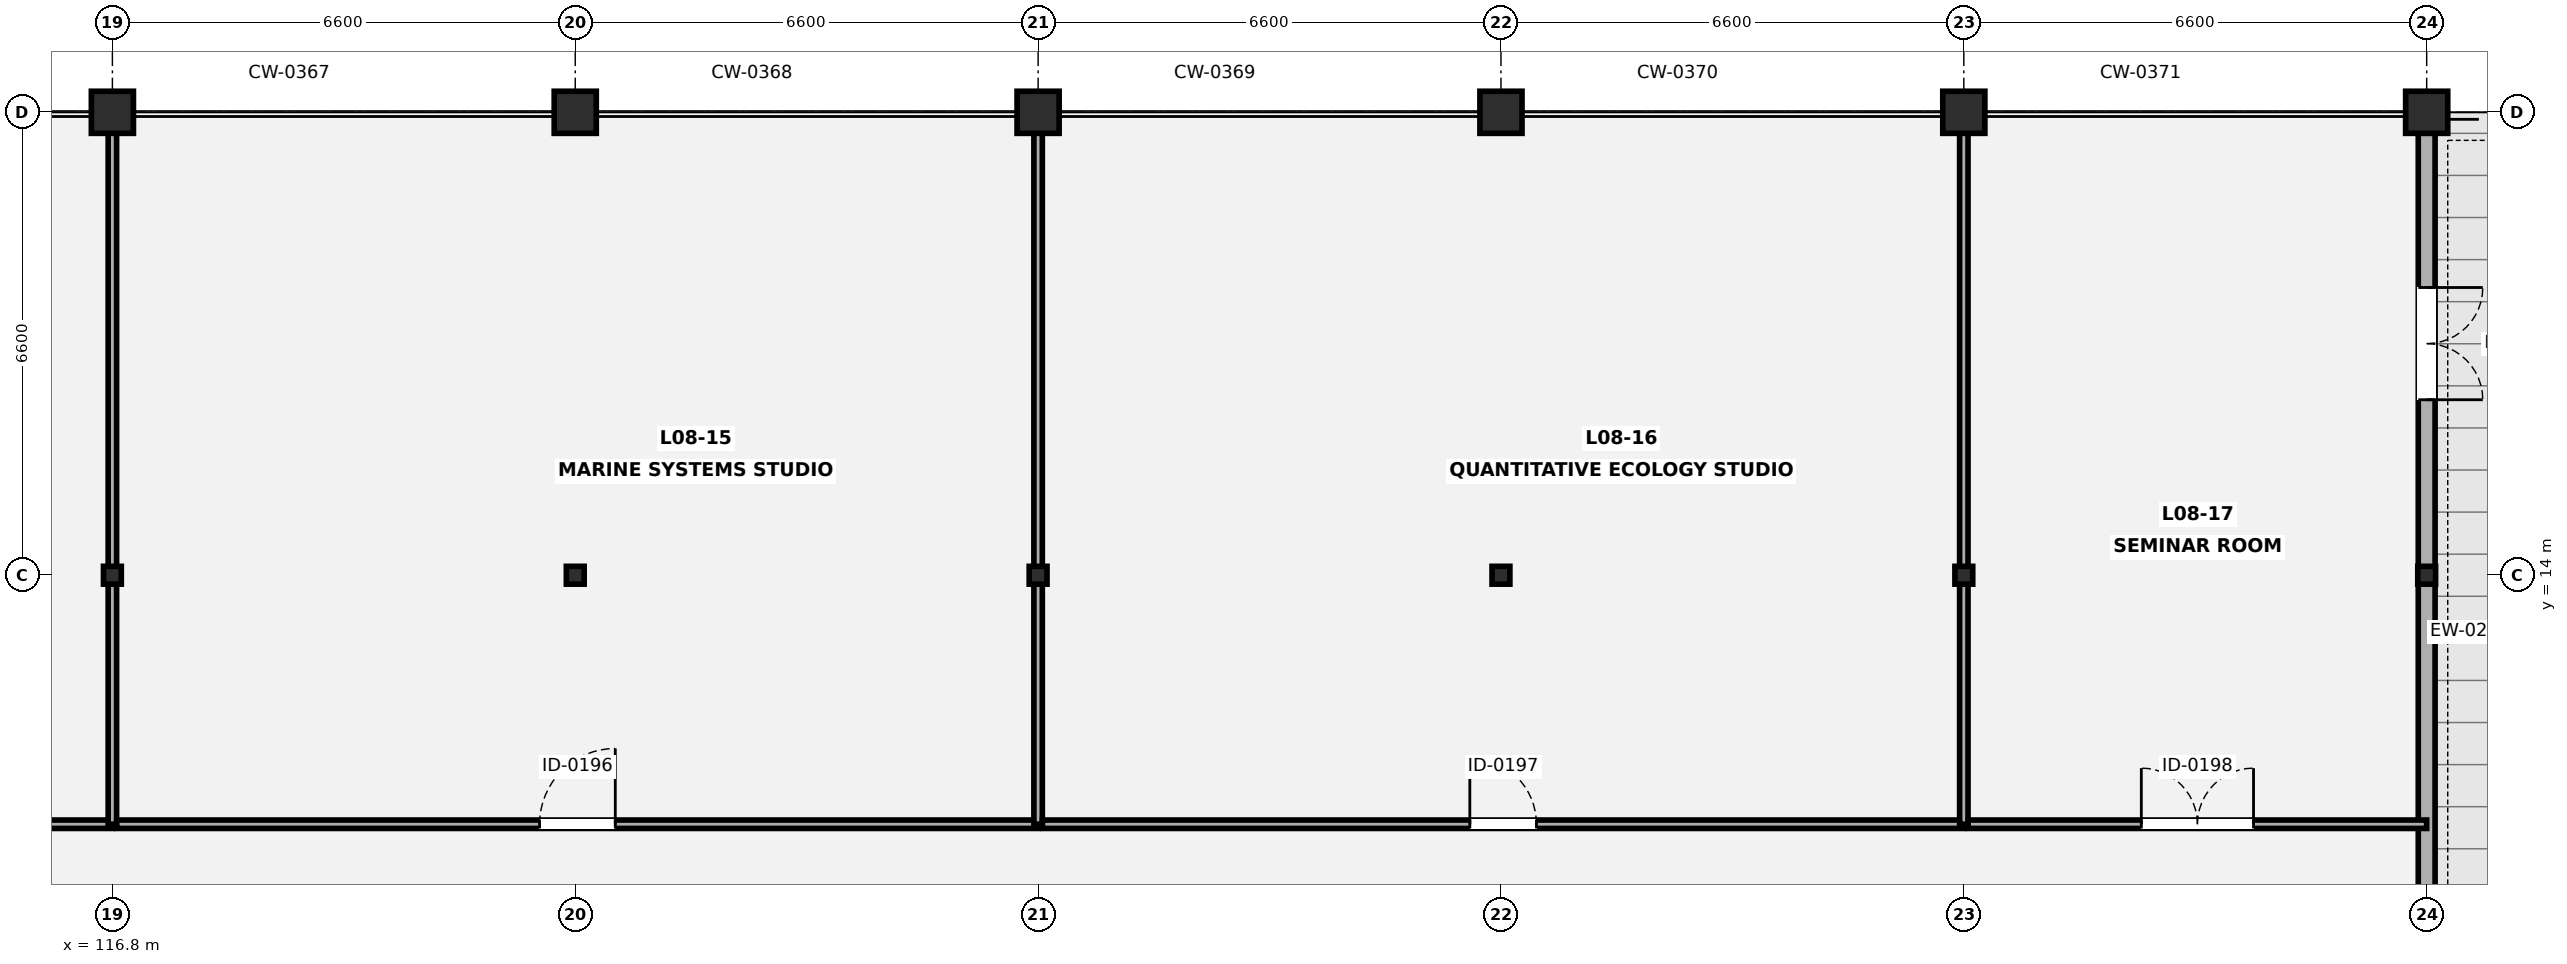
"""IFC4 building model, lengths in metres.
Left out: names, types, materials, properties, quantities, classifications, styles, units other than length and angle.
Written with IfcOpenShell. Run it as: python <this file> out.ifc"""

import sys

from ifc_helpers import new_model, si_unit, direction, frame, frame_2d, origin, origin_2d, place, context, subcontext, project, spatial, rectangle, circle, i_section, extrude, element, fill, save


model = new_model("IFC4")
c1 = context("Model", 3, precision=1e-05, world=origin(), true_north=direction((0.0, 1.0)))
c2 = subcontext(c1, "Body", "Model", "MODEL_VIEW")
j1 = project(units=[si_unit("LENGTHUNIT", "METRE"), si_unit("PLANEANGLEUNIT", "RADIAN")], contexts=[c1])
p1 = place(None, origin())
s1 = spatial("IfcSite", under=j1, at=p1, CompositionType="ELEMENT")
p2 = place(p1, origin())
s2 = spatial("IfcBuilding", under=s1, at=p2, CompositionType="ELEMENT")
p3 = place(p2, frame((0.0, 0.0, 34.3)))
s3 = spatial("IfcBuildingStorey", under=s2, at=p3, CompositionType="ELEMENT", Elevation=34.3)
p4 = place(p3, frame((116.8, 14.0, 0.0), z_axis=(0.0, 0.0, 1.0), x_axis=(1.0, 0.0, 0.0)))
e1 = element("IfcColumn", 1, at=p4, inside=s3, PredefinedType="COLUMN", context=c2, shape_type="SweptSolid", body=[
    extrude(i_section(OverallWidth=0.254, OverallDepth=0.254, WebThickness=0.009, FlangeThickness=0.014, FilletRadius=0.014, at=origin_2d()), origin(), (0.0, 0.0, 1.0), 3.85),
])
p5 = place(p3, frame((116.8, 20.6, 0.0), z_axis=(0.0, 0.0, 1.0), x_axis=(1.0, 0.0, 0.0)))
e2 = element("IfcColumn", 2, at=p5, inside=s3, PredefinedType="PILASTER", context=c2, shape_type="SweptSolid", body=[
    extrude(circle(Radius=0.3, at=origin_2d()), origin(), (0.0, 0.0, 1.0), 3.85),
])
p6 = place(p3, frame((123.4, 14.0, 0.0), z_axis=(0.0, 0.0, 1.0), x_axis=(1.0, 0.0, 0.0)))
e3 = element("IfcColumn", 3, at=p6, inside=s3, PredefinedType="COLUMN", context=c2, shape_type="SweptSolid", body=[
    extrude(i_section(OverallWidth=0.254, OverallDepth=0.254, WebThickness=0.009, FlangeThickness=0.014, FilletRadius=0.014, at=origin_2d()), origin(), (0.0, 0.0, 1.0), 3.85),
])
p7 = place(p3, frame((123.4, 20.6, 0.0), z_axis=(0.0, 0.0, 1.0), x_axis=(1.0, 0.0, 0.0)))
e4 = element("IfcColumn", 4, at=p7, inside=s3, PredefinedType="PILASTER", context=c2, shape_type="SweptSolid", body=[
    extrude(circle(Radius=0.3, at=origin_2d()), origin(), (0.0, 0.0, 1.0), 3.85),
])
p8 = place(p3, frame((130.0, 14.0, 0.0), z_axis=(0.0, 0.0, 1.0), x_axis=(1.0, 0.0, 0.0)))
e5 = element("IfcColumn", 5, at=p8, inside=s3, PredefinedType="COLUMN", context=c2, shape_type="SweptSolid", body=[
    extrude(i_section(OverallWidth=0.254, OverallDepth=0.254, WebThickness=0.009, FlangeThickness=0.014, FilletRadius=0.014, at=origin_2d()), origin(), (0.0, 0.0, 1.0), 3.85),
])
p9 = place(p3, frame((130.0, 20.6, 0.0), z_axis=(0.0, 0.0, 1.0), x_axis=(1.0, 0.0, 0.0)))
e6 = element("IfcColumn", 6, at=p9, inside=s3, PredefinedType="PILASTER", context=c2, shape_type="SweptSolid", body=[
    extrude(circle(Radius=0.3, at=origin_2d()), origin(), (0.0, 0.0, 1.0), 3.85),
])
p10 = place(p3, frame((136.6, 14.0, 0.0), z_axis=(0.0, 0.0, 1.0), x_axis=(1.0, 0.0, 0.0)))
e7 = element("IfcColumn", 7, at=p10, inside=s3, PredefinedType="COLUMN", context=c2, shape_type="SweptSolid", body=[
    extrude(i_section(OverallWidth=0.254, OverallDepth=0.254, WebThickness=0.009, FlangeThickness=0.014, FilletRadius=0.014, at=origin_2d()), origin(), (0.0, 0.0, 1.0), 3.85),
])
p11 = place(p3, frame((136.6, 20.6, 0.0), z_axis=(0.0, 0.0, 1.0), x_axis=(1.0, 0.0, 0.0)))
e8 = element("IfcColumn", 8, at=p11, inside=s3, PredefinedType="PILASTER", context=c2, shape_type="SweptSolid", body=[
    extrude(circle(Radius=0.3, at=origin_2d()), origin(), (0.0, 0.0, 1.0), 3.85),
])
p12 = place(p3, frame((143.2, 14.0, 0.0), z_axis=(0.0, 0.0, 1.0), x_axis=(1.0, 0.0, 0.0)))
e9 = element("IfcColumn", 9, at=p12, inside=s3, PredefinedType="COLUMN", context=c2, shape_type="SweptSolid", body=[
    extrude(i_section(OverallWidth=0.254, OverallDepth=0.254, WebThickness=0.009, FlangeThickness=0.014, FilletRadius=0.014, at=origin_2d()), origin(), (0.0, 0.0, 1.0), 3.85),
])
p13 = place(p3, frame((143.2, 20.6, 0.0), z_axis=(0.0, 0.0, 1.0), x_axis=(1.0, 0.0, 0.0)))
e10 = element("IfcColumn", 10, at=p13, inside=s3, PredefinedType="PILASTER", context=c2, shape_type="SweptSolid", body=[
    extrude(circle(Radius=0.3, at=origin_2d()), origin(), (0.0, 0.0, 1.0), 3.85),
])
p14 = place(p3, frame((149.8, 14.0, 0.0), z_axis=(0.0, 0.0, 1.0), x_axis=(1.0, 0.0, 0.0)))
e11 = element("IfcColumn", 11, at=p14, inside=s3, PredefinedType="COLUMN", context=c2, shape_type="SweptSolid", body=[
    extrude(i_section(OverallWidth=0.254, OverallDepth=0.254, WebThickness=0.009, FlangeThickness=0.014, FilletRadius=0.014, at=origin_2d()), origin(), (0.0, 0.0, 1.0), 3.85),
])
p15 = place(p3, frame((149.8, 20.6, 0.0), z_axis=(0.0, 0.0, 1.0), x_axis=(1.0, 0.0, 0.0)))
e12 = element("IfcColumn", 12, at=p15, inside=s3, PredefinedType="PILASTER", context=c2, shape_type="SweptSolid", body=[
    extrude(circle(Radius=0.3, at=origin_2d()), origin(), (0.0, 0.0, 1.0), 3.85),
])
p16 = place(p3, frame((149.8, 20.302, 0.0), z_axis=(0.0, 0.0, 1.0), x_axis=(0.0, -1.0, 0.0)))
e13 = element("IfcWall", 13, at=p16, inside=s3, PredefinedType="SOLIDWALL", context=c2, shape_type="SweptSolid", body=[
    extrude(rectangle(XDim=19.204, YDim=0.24, at=frame_2d((9.602, 0.0))), origin(), (0.0, 0.0, 1.0), 3.022),
])
p17 = place(p16, frame((2.2, 0.0, 0.0)))
e14 = element("IfcOpeningElement", 14, at=p17, cuts=e13, PredefinedType="OPENING", context=c2, shape_type="SweptSolid", body=[
    extrude(rectangle(XDim=1.6, YDim=2.15, at=frame_2d((0.8, 1.075))), frame((0.0, 0.13, 0.0), z_axis=(0.0, -1.0, 0.0), x_axis=(1.0, 0.0, 0.0)), (0.0, 0.0, 1.0), 0.26),
])
p18 = place(p16, frame((15.102, 0.0, 0.85)))
e15 = element("IfcOpeningElement", 15, at=p18, cuts=e13, PredefinedType="OPENING", context=c2, shape_type="SweptSolid", body=[
    extrude(rectangle(XDim=1.4, YDim=1.4, at=frame_2d((0.7, 0.7))), frame((0.0, 0.13, 0.0), z_axis=(0.0, -1.0, 0.0), x_axis=(1.0, 0.0, 0.0)), (0.0, 0.0, 1.0), 0.26),
])
p19 = place(p3, frame((103.6, 10.45, 0.0), z_axis=(0.0, 0.0, 1.0), x_axis=(1.0, 0.0, 0.0)))
e16 = element("IfcWall", 16, at=p19, inside=s3, PredefinedType="PARTITIONING", context=c2, shape_type="SweptSolid", body=[
    extrude(rectangle(XDim=13.2, YDim=0.12, at=frame_2d((6.6, 0.0))), origin(), (0.0, 0.0, 1.0), 3.196),
])
p20 = place(p19, frame((6.125, 0.0, 0.0)))
e17 = element("IfcOpeningElement", 17, at=p20, cuts=e16, PredefinedType="OPENING", context=c2, shape_type="SweptSolid", body=[
    extrude(rectangle(XDim=0.95, YDim=2.1, at=frame_2d((0.475, 1.05))), frame((0.0, 0.07, 0.0), z_axis=(0.0, -1.0, 0.0), x_axis=(1.0, 0.0, 0.0)), (0.0, 0.0, 1.0), 0.14),
])
p21 = place(p3, frame((116.8, 10.45, 0.0), z_axis=(0.0, 0.0, 1.0), x_axis=(0.0, 1.0, 0.0)))
e18 = element("IfcWall", 18, at=p21, inside=s3, PredefinedType="PARTITIONING", context=c2, shape_type="SweptSolid", body=[
    extrude(rectangle(XDim=10.15, YDim=0.12, at=frame_2d((5.075, 0.0))), origin(), (0.0, 0.0, 1.0), 3.022),
])
p22 = place(p3, frame((116.862, 10.45, 0.0), z_axis=(0.0, 0.0, 1.0), x_axis=(1.0, 0.0, 0.0)))
e19 = element("IfcWall", 19, at=p22, inside=s3, PredefinedType="PARTITIONING", context=c2, shape_type="SweptSolid", body=[
    extrude(rectangle(XDim=13.138, YDim=0.12, at=frame_2d((6.569, 0.0))), origin(), (0.0, 0.0, 1.0), 3.196),
])
p23 = place(p22, frame((6.029, 0.0, 0.0)))
e20 = element("IfcOpeningElement", 20, at=p23, cuts=e19, PredefinedType="OPENING", context=c2, shape_type="SweptSolid", body=[
    extrude(rectangle(XDim=1.08, YDim=2.12, at=frame_2d((0.54, 1.06))), frame((0.0, 0.07, 0.0), z_axis=(0.0, -1.0, 0.0), x_axis=(1.0, 0.0, 0.0)), (0.0, 0.0, 1.0), 0.14),
])
p24 = place(p3, frame((130.0, 10.45, 0.0), z_axis=(0.0, 0.0, 1.0), x_axis=(0.0, 1.0, 0.0)))
e21 = element("IfcWall", 21, at=p24, inside=s3, PredefinedType="PARTITIONING", context=c2, shape_type="SweptSolid", body=[
    extrude(rectangle(XDim=10.15, YDim=0.12, at=frame_2d((5.075, 0.0))), origin(), (0.0, 0.0, 1.0), 3.022),
])
p25 = place(p3, frame((130.062, 10.45, 0.0), z_axis=(0.0, 0.0, 1.0), x_axis=(1.0, 0.0, 0.0)))
e22 = element("IfcWall", 22, at=p25, inside=s3, PredefinedType="PARTITIONING", context=c2, shape_type="SweptSolid", body=[
    extrude(rectangle(XDim=13.138, YDim=0.12, at=frame_2d((6.569, 0.0))), origin(), (0.0, 0.0, 1.0), 3.196),
])
p26 = place(p25, frame((6.094, 0.0, 0.0)))
e23 = element("IfcOpeningElement", 23, at=p26, cuts=e22, PredefinedType="OPENING", context=c2, shape_type="SweptSolid", body=[
    extrude(rectangle(XDim=0.95, YDim=2.1, at=frame_2d((0.475, 1.05))), frame((0.0, 0.07, 0.0), z_axis=(0.0, -1.0, 0.0), x_axis=(1.0, 0.0, 0.0)), (0.0, 0.0, 1.0), 0.14),
])
p27 = place(p3, frame((143.2, 10.45, 0.0), z_axis=(0.0, 0.0, 1.0), x_axis=(0.0, 1.0, 0.0)))
e24 = element("IfcWall", 24, at=p27, inside=s3, PredefinedType="PARTITIONING", context=c2, shape_type="SweptSolid", body=[
    extrude(rectangle(XDim=10.15, YDim=0.12, at=frame_2d((5.075, 0.0))), origin(), (0.0, 0.0, 1.0), 3.022),
])
p28 = place(p3, frame((143.262, 10.45, 0.0), z_axis=(0.0, 0.0, 1.0), x_axis=(1.0, 0.0, 0.0)))
e25 = element("IfcWall", 25, at=p28, inside=s3, PredefinedType="PARTITIONING", context=c2, shape_type="SweptSolid", body=[
    extrude(rectangle(XDim=6.538, YDim=0.12, at=frame_2d((3.269, 0.0))), origin(), (0.0, 0.0, 1.0), 3.196),
])
p29 = place(p28, frame((2.469, 0.0, 0.0)))
e26 = element("IfcOpeningElement", 26, at=p29, cuts=e25, PredefinedType="OPENING", context=c2, shape_type="SweptSolid", body=[
    extrude(rectangle(XDim=1.6, YDim=2.18, at=frame_2d((0.8, 1.09))), frame((0.0, 0.07, 0.0), z_axis=(0.0, -1.0, 0.0), x_axis=(1.0, 0.0, 0.0)), (0.0, 0.0, 1.0), 0.14),
])
p30 = place(p17, origin())
e27 = element("IfcDoor", 27, at=p30, inside=s3, OperationType="DOUBLE_DOOR_SINGLE_SWING", PredefinedType="DOOR", context=c2, shape_type="SweptSolid", body=[
    extrude(rectangle(XDim=1.6, YDim=2.15, at=frame_2d((0.8, 1.075))), frame((0.0, 0.025, 0.0), z_axis=(0.0, -1.0, 0.0), x_axis=(1.0, 0.0, 0.0)), (0.0, 0.0, 1.0), 0.05),
])
fill(e14, e27)
p31 = place(p23, origin())
e28 = element("IfcDoor", 28, at=p31, inside=s3, OperationType="SINGLE_SWING_RIGHT", PredefinedType="DOOR", context=c2, shape_type="SweptSolid", body=[
    extrude(rectangle(XDim=1.08, YDim=2.12, at=frame_2d((0.54, 1.06))), frame((0.0, 0.025, 0.0), z_axis=(0.0, -1.0, 0.0), x_axis=(1.0, 0.0, 0.0)), (0.0, 0.0, 1.0), 0.05),
])
fill(e20, e28)
p32 = place(p26, origin())
e29 = element("IfcDoor", 29, at=p32, inside=s3, OperationType="SINGLE_SWING_LEFT", PredefinedType="DOOR", context=c2, shape_type="SweptSolid", body=[
    extrude(rectangle(XDim=0.95, YDim=2.1, at=frame_2d((0.475, 1.05))), frame((0.0, 0.025, 0.0), z_axis=(0.0, -1.0, 0.0), x_axis=(1.0, 0.0, 0.0)), (0.0, 0.0, 1.0), 0.05),
])
fill(e23, e29)
p33 = place(p29, origin())
e30 = element("IfcDoor", 30, at=p33, inside=s3, OperationType="DOUBLE_DOOR_SINGLE_SWING", PredefinedType="DOOR", context=c2, shape_type="SweptSolid", body=[
    extrude(rectangle(XDim=1.6, YDim=2.18, at=frame_2d((0.8, 1.09))), frame((0.0, 0.025, 0.0), z_axis=(0.0, -1.0, 0.0), x_axis=(1.0, 0.0, 0.0)), (0.0, 0.0, 1.0), 0.05),
])
fill(e26, e30)
save(model, sys.argv[1])
